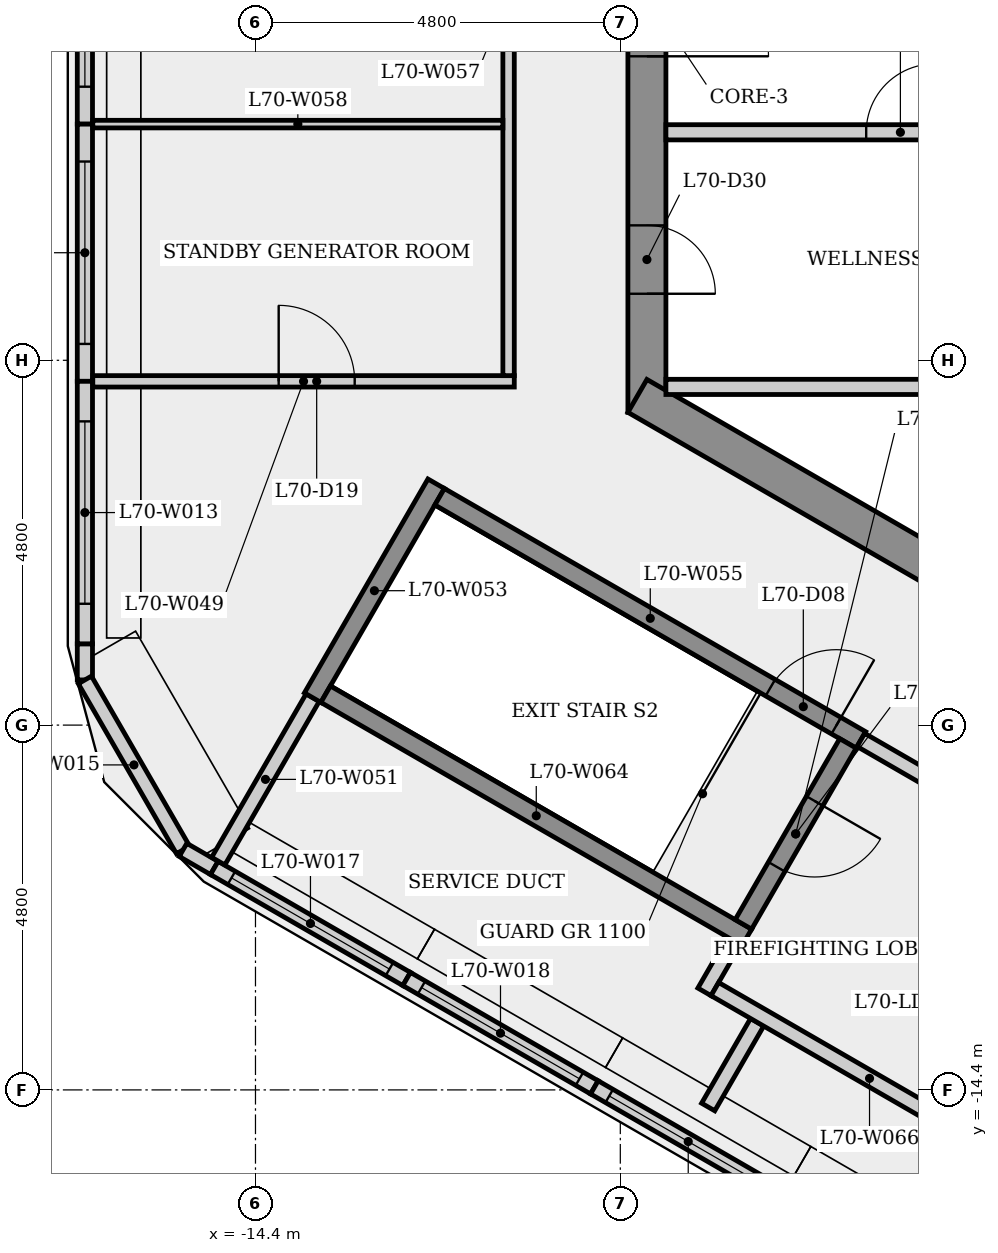
"""IFC4 building model, lengths in metres.
Left out: names, types, materials, properties, quantities, classifications, styles, units other than length and angle.
Written with IfcOpenShell. Run it as: python <this file> out.ifc"""

import sys

from ifc_helpers import new_model, si_unit, direction, frame, frame_2d, origin, place, context, subcontext, project, spatial, rectangle, extrude, element, fill, save


model = new_model("IFC4")
c1 = context("Model", 3, precision=1e-05, world=origin(), true_north=direction((0.0, 1.0)))
c2 = subcontext(c1, "Body", "Model", "MODEL_VIEW")
j1 = project(units=[si_unit("LENGTHUNIT", "METRE"), si_unit("PLANEANGLEUNIT", "RADIAN")], contexts=[c1])
p1 = place(None, origin())
s1 = spatial("IfcSite", under=j1, at=p1, CompositionType="ELEMENT")
p2 = place(p1, origin())
s2 = spatial("IfcBuilding", under=s1, at=p2, CompositionType="ELEMENT")
p3 = place(p2, frame((0.0, 0.0, 262.9)))
s3 = spatial("IfcBuildingStorey", under=s2, at=p3, CompositionType="ELEMENT", Elevation=262.9)
p4 = place(p3, frame((-9.25, 5.485, 0.0), z_axis=(0.0, 0.0, 1.0), x_axis=(0.0, -1.0, 0.0)))
e1 = element("IfcWall", 1, at=p4, inside=s3, PredefinedType="SHEAR", context=c2, shape_type="SweptSolid", body=[
    extrude(rectangle(XDim=10.97, YDim=0.5, at=frame_2d((5.485, 0.0))), origin(), (0.0, 0.0, 1.0), 4.8),
])
p5 = place(p4, frame((8.509, 0.0, 0.0)))
e2 = element("IfcOpeningElement", 2, at=p5, cuts=e1, PredefinedType="OPENING", context=c2, shape_type="SweptSolid", body=[
    extrude(rectangle(XDim=0.9, YDim=2.1, at=frame_2d((0.45, 1.05))), frame((0.0, 0.26, 0.0), z_axis=(0.0, -1.0, 0.0), x_axis=(1.0, 0.0, 0.0)), (0.0, 0.0, 1.0), 0.52),
])
p6 = place(p4, frame((4.685, 0.0, 0.0)))
e3 = element("IfcOpeningElement", 3, at=p6, cuts=e1, PredefinedType="OPENING", context=c2, shape_type="SweptSolid", body=[
    extrude(rectangle(XDim=1.6, YDim=2.1, at=frame_2d((0.8, 1.05))), frame((0.0, 0.26, 0.0), z_axis=(0.0, -1.0, 0.0), x_axis=(1.0, 0.0, 0.0)), (0.0, 0.0, 1.0), 0.52),
])
p7 = place(p3, frame((-9.375, -5.268, 0.0), z_axis=(0.0, 0.0, 1.0), x_axis=(0.866023993627, -0.500002442456, 0.0)))
e4 = element("IfcWall", 4, at=p7, inside=s3, PredefinedType="SHEAR", context=c2, shape_type="SweptSolid", body=[
    extrude(rectangle(XDim=10.97, YDim=0.5, at=frame_2d((5.485, 0.0))), origin(), (0.0, 0.0, 1.0), 4.8),
])
p8 = place(p7, frame((4.804, 0.0, 0.0)))
e5 = element("IfcOpeningElement", 5, at=p8, cuts=e4, PredefinedType="OPENING", context=c2, shape_type="SweptSolid", body=[
    extrude(rectangle(XDim=0.9, YDim=2.1, at=frame_2d((0.45, 1.05))), frame((0.0, 0.26, 0.0), z_axis=(0.0, -1.0, 0.0), x_axis=(1.0, 0.0, 0.0)), (0.0, 0.0, 1.0), 0.52),
])
p9 = place(p3, frame((-16.645, 1.692, 0.0), z_axis=(0.0, 0.0, 1.0), x_axis=(0.0, -1.0, 0.0)))
e6 = element("IfcWall", 6, at=p9, inside=s3, PredefinedType="SOLIDWALL", context=c2, shape_type="SweptSolid", body=[
    extrude(rectangle(XDim=3.385, YDim=0.2, at=frame_2d((1.692, 0.0))), origin(), (0.0, 0.0, 1.0), 4.8),
])
p10 = place(p9, frame((0.492, 0.0, 0.8)))
e7 = element("IfcOpeningElement", 7, at=p10, cuts=e6, PredefinedType="OPENING", context=c2, shape_type="SweptSolid", body=[
    extrude(rectangle(XDim=2.4, YDim=2.4, at=frame_2d((1.2, 1.2))), frame((0.0, 0.11, 0.0), z_axis=(0.0, -1.0, 0.0), x_axis=(1.0, 0.0, 0.0)), (0.0, 0.0, 1.0), 0.22),
])
p11 = place(p3, frame((-16.645, -1.693, 0.0), z_axis=(0.0, 0.0, 1.0), x_axis=(0.0, -1.0, 0.0)))
e8 = element("IfcWall", 8, at=p11, inside=s3, PredefinedType="SOLIDWALL", context=c2, shape_type="SweptSolid", body=[
    extrude(rectangle(XDim=3.384, YDim=0.2, at=frame_2d((1.692, 0.0))), origin(), (0.0, 0.0, 1.0), 4.8),
])
p12 = place(p11, frame((0.492, 0.0, 0.8)))
e9 = element("IfcOpeningElement", 9, at=p12, cuts=e8, PredefinedType="OPENING", context=c2, shape_type="SweptSolid", body=[
    extrude(rectangle(XDim=2.4, YDim=2.4, at=frame_2d((1.2, 1.2))), frame((0.0, 0.11, 0.0), z_axis=(0.0, -1.0, 0.0), x_axis=(1.0, 0.0, 0.0)), (0.0, 0.0, 1.0), 0.22),
])
p13 = place(p3, frame((-16.645, -5.076, 0.0), z_axis=(0.0, 0.0, 1.0), x_axis=(0.0, -1.0, 0.0)))
e10 = element("IfcWall", 10, at=p13, inside=s3, PredefinedType="SOLIDWALL", context=c2, shape_type="SweptSolid", body=[
    extrude(rectangle(XDim=3.454, YDim=0.2, at=frame_2d((1.727, 0.0))), origin(), (0.0, 0.0, 1.0), 4.8),
])
p14 = place(p13, frame((0.527, 0.0, 0.8)))
e11 = element("IfcOpeningElement", 11, at=p14, cuts=e10, PredefinedType="OPENING", context=c2, shape_type="SweptSolid", body=[
    extrude(rectangle(XDim=2.4, YDim=2.4, at=frame_2d((1.2, 1.2))), frame((0.0, 0.11, 0.0), z_axis=(0.0, -1.0, 0.0), x_axis=(1.0, 0.0, 0.0)), (0.0, 0.0, 1.0), 0.22),
])
p15 = place(p3, frame((-16.645, -8.531, 0.0), z_axis=(0.0, 0.0, 1.0), x_axis=(0.0, -1.0, 0.0)))
e12 = element("IfcWall", 12, at=p15, inside=s3, PredefinedType="SOLIDWALL", context=c2, shape_type="SweptSolid", body=[
    extrude(rectangle(XDim=0.475, YDim=0.2, at=frame_2d((0.237, 0.0))), origin(), (0.0, 0.0, 1.0), 4.8),
])
p16 = place(p3, frame((-16.645, -9.005, 0.0), z_axis=(0.0, 0.0, 1.0), x_axis=(0.499992497538, -0.86602973529, 0.0)))
e13 = element("IfcWall", 13, at=p16, inside=s3, PredefinedType="SOLIDWALL", context=c2, shape_type="SweptSolid", body=[
    extrude(rectangle(XDim=2.583, YDim=0.2, at=frame_2d((1.291, 0.0))), origin(), (0.0, 0.0, 1.0), 4.8),
])
p17 = place(p3, frame((-15.353, -11.242, 0.0), z_axis=(0.0, 0.0, 1.0), x_axis=(0.865988727248, -0.500063520245, 0.0)))
e14 = element("IfcWall", 14, at=p17, inside=s3, PredefinedType="SOLIDWALL", context=c2, shape_type="SweptSolid", body=[
    extrude(rectangle(XDim=0.475, YDim=0.2, at=frame_2d((0.238, 0.0))), origin(), (0.0, 0.0, 1.0), 4.8),
])
p18 = place(p3, frame((-14.942, -11.479, 0.0), z_axis=(0.0, 0.0, 1.0), x_axis=(0.866033925456, -0.499985239742, 0.0)))
e15 = element("IfcWall", 15, at=p18, inside=s3, PredefinedType="SOLIDWALL", context=c2, shape_type="SweptSolid", body=[
    extrude(rectangle(XDim=2.922, YDim=0.2, at=frame_2d((1.461, 0.0))), origin(), (0.0, 0.0, 1.0), 4.8),
])
p19 = place(p18, frame((0.261, 0.0, 0.8)))
e16 = element("IfcOpeningElement", 16, at=p19, cuts=e15, PredefinedType="OPENING", context=c2, shape_type="SweptSolid", body=[
    extrude(rectangle(XDim=2.4, YDim=2.4, at=frame_2d((1.2, 1.2))), frame((0.0, 0.11, 0.0), z_axis=(0.0, -1.0, 0.0), x_axis=(1.0, 0.0, 0.0)), (0.0, 0.0, 1.0), 0.22),
])
p20 = place(p3, frame((-12.411, -12.94, 0.0), z_axis=(0.0, 0.0, 1.0), x_axis=(0.866027356191, -0.499996618317, 0.0)))
e17 = element("IfcWall", 17, at=p20, inside=s3, PredefinedType="SOLIDWALL", context=c2, shape_type="SweptSolid", body=[
    extrude(rectangle(XDim=2.852, YDim=0.2, at=frame_2d((1.426, 0.0))), origin(), (0.0, 0.0, 1.0), 4.8),
])
p21 = place(p20, frame((0.226, 0.0, 0.8)))
e18 = element("IfcOpeningElement", 18, at=p21, cuts=e17, PredefinedType="OPENING", context=c2, shape_type="SweptSolid", body=[
    extrude(rectangle(XDim=2.4, YDim=2.4, at=frame_2d((1.2, 1.2))), frame((0.0, 0.11, 0.0), z_axis=(0.0, -1.0, 0.0), x_axis=(1.0, 0.0, 0.0)), (0.0, 0.0, 1.0), 0.22),
])
p22 = place(p3, frame((-9.941, -14.366, 0.0), z_axis=(0.0, 0.0, 1.0), x_axis=(0.866027356191, -0.499996618317, 0.0)))
e19 = element("IfcWall", 19, at=p22, inside=s3, PredefinedType="SOLIDWALL", context=c2, shape_type="SweptSolid", body=[
    extrude(rectangle(XDim=2.852, YDim=0.2, at=frame_2d((1.426, 0.0))), origin(), (0.0, 0.0, 1.0), 4.8),
])
p23 = place(p22, frame((0.226, 0.0, 0.8)))
e20 = element("IfcOpeningElement", 20, at=p23, cuts=e19, PredefinedType="OPENING", context=c2, shape_type="SweptSolid", body=[
    extrude(rectangle(XDim=2.4, YDim=2.4, at=frame_2d((1.2, 1.2))), frame((0.0, 0.11, 0.0), z_axis=(0.0, -1.0, 0.0), x_axis=(1.0, 0.0, 0.0)), (0.0, 0.0, 1.0), 0.22),
])
p24 = place(p3, frame((-16.541, -5.077, 0.0), z_axis=(0.0, 0.0, 1.0), x_axis=(1.0, 0.0, 0.0)))
e21 = element("IfcWall", 21, at=p24, inside=s3, PredefinedType="PARTITIONING", context=c2, shape_type="SweptSolid", body=[
    extrude(rectangle(XDim=5.545, YDim=0.15, at=frame_2d((2.773, 0.0))), origin(), (0.0, 0.0, 1.0), 4.5),
])
p25 = place(p24, frame((2.446, 0.0, 0.0)))
e22 = element("IfcOpeningElement", 22, at=p25, cuts=e21, PredefinedType="OPENING", context=c2, shape_type="SweptSolid", body=[
    extrude(rectangle(XDim=1.0, YDim=2.1, at=frame_2d((0.5, 1.05))), frame((0.0, 0.085, 0.0), z_axis=(0.0, -1.0, 0.0), x_axis=(1.0, 0.0, 0.0)), (0.0, 0.0, 1.0), 0.17),
])
p26 = place(p3, frame((-14.89, -11.39, 0.0), z_axis=(0.0, 0.0, 1.0), x_axis=(0.499966389646, 0.866044807862, 0.0)))
e23 = element("IfcWall", 23, at=p26, inside=s3, PredefinedType="PLUMBINGWALL", context=c2, shape_type="SweptSolid", body=[
    extrude(rectangle(XDim=2.484, YDim=0.2, at=frame_2d((1.242, 0.0))), origin(), (0.0, 0.0, 1.0), 4.5),
])
p27 = place(p3, frame((-13.648, -9.239, 0.0), z_axis=(0.0, 0.0, 1.0), x_axis=(0.500017246033, 0.866015446554, 0.0)))
e24 = element("IfcWall", 24, at=p27, inside=s3, PredefinedType="SHEAR", context=c2, shape_type="SweptSolid", body=[
    extrude(rectangle(XDim=3.25, YDim=0.25, at=frame_2d((1.625, 0.0))), origin(), (0.0, 0.0, 1.0), 4.5),
])
p28 = place(p3, frame((-11.977, -6.595, 0.0), z_axis=(0.0, 0.0, 1.0), x_axis=(0.866025499775, -0.499999833739, 0.0)))
e25 = element("IfcWall", 25, at=p28, inside=s3, PredefinedType="SHEAR", context=c2, shape_type="SweptSolid", body=[
    extrude(rectangle(XDim=6.4, YDim=0.25, at=frame_2d((3.2, 0.0))), origin(), (0.0, 0.0, 1.0), 4.5),
])
p29 = place(p28, frame((5.025, 0.0, 0.0)))
e26 = element("IfcOpeningElement", 26, at=p29, cuts=e25, PredefinedType="OPENING", context=c2, shape_type="SweptSolid", body=[
    extrude(rectangle(XDim=1.0, YDim=2.1, at=frame_2d((0.5, 1.05))), frame((0.0, 0.135, 0.0), z_axis=(0.0, -1.0, 0.0), x_axis=(1.0, 0.0, 0.0)), (0.0, 0.0, 1.0), 0.27),
])
p30 = place(p3, frame((-11.07, -5.002, 0.0), z_axis=(0.0, 0.0, 1.0), x_axis=(0.0, 1.0, 0.0)))
e27 = element("IfcWall", 27, at=p30, inside=s3, PredefinedType="PARTITIONING", context=c2, shape_type="SweptSolid", body=[
    extrude(rectangle(XDim=10.003, YDim=0.15, at=frame_2d((5.002, 0.0))), origin(), (0.0, 0.0, 1.0), 4.5),
])
p31 = place(p30, frame((6.172, 0.0, 0.0)))
e28 = element("IfcOpeningElement", 28, at=p31, cuts=e27, PredefinedType="OPENING", context=c2, shape_type="SweptSolid", body=[
    extrude(rectangle(XDim=1.0, YDim=2.1, at=frame_2d((0.5, 1.05))), frame((0.0, 0.085, 0.0), z_axis=(0.0, -1.0, 0.0), x_axis=(1.0, 0.0, 0.0)), (0.0, 0.0, 1.0), 0.17),
])
p32 = place(p3, frame((-11.145, -1.692, 0.0), z_axis=(0.0, 0.0, 1.0), x_axis=(-1.0, 0.0, 0.0)))
e29 = element("IfcWall", 29, at=p32, inside=s3, PredefinedType="PARTITIONING", context=c2, shape_type="SweptSolid", body=[
    extrude(rectangle(XDim=5.396, YDim=0.1, at=frame_2d((2.698, 0.0))), origin(), (0.0, 0.0, 1.0), 4.5),
])
p33 = place(p3, frame((-9.0, -5.15, 0.0), z_axis=(0.0, 0.0, 1.0), x_axis=(1.0, 0.0, 0.0)))
e30 = element("IfcWall", 30, at=p33, inside=s3, PredefinedType="PARTITIONING", context=c2, shape_type="SweptSolid", body=[
    extrude(rectangle(XDim=11.325, YDim=0.2, at=frame_2d((5.663, 0.0))), origin(), (0.0, 0.0, 1.0), 4.5),
])
p34 = place(p3, frame((-8.493, -13.11, 0.0), z_axis=(0.0, 0.0, 1.0), x_axis=(0.500067724834, 0.865986299303, 0.0)))
e31 = element("IfcWall", 31, at=p34, inside=s3, PredefinedType="PLUMBINGWALL", context=c2, shape_type="SweptSolid", body=[
    extrude(rectangle(XDim=0.775, YDim=0.2, at=frame_2d((0.388, 0.0))), origin(), (0.0, 0.0, 1.0), 4.5),
])
p35 = place(p3, frame((-7.935, -12.393, 0.0), z_axis=(0.0, 0.0, 1.0), x_axis=(-0.866025499775, 0.499999833739, 0.0)))
e32 = element("IfcWall", 32, at=p35, inside=s3, PredefinedType="SHEAR", context=c2, shape_type="SweptSolid", body=[
    extrude(rectangle(XDim=6.4, YDim=0.25, at=frame_2d((3.2, 0.0))), origin(), (0.0, 0.0, 1.0), 4.5),
])
p36 = place(p3, frame((-7.8, -13.51, 0.0), z_axis=(0.0, 0.0, 1.0), x_axis=(-0.499892088923, -0.86608769731, 0.0)))
e33 = element("IfcWall", 33, at=p36, inside=s3, PredefinedType="PLUMBINGWALL", context=c2, shape_type="SweptSolid", body=[
    extrude(rectangle(XDim=1.287, YDim=0.2, at=frame_2d((0.644, 0.0))), origin(), (0.0, 0.0, 1.0), 4.5),
])
p37 = place(p3, frame((-8.356, -13.073, 0.0), z_axis=(0.0, 0.0, 1.0), x_axis=(0.866038532462, -0.499977259774, 0.0)))
e34 = element("IfcWall", 34, at=p37, inside=s3, PredefinedType="PLUMBINGWALL", context=c2, shape_type="SweptSolid", body=[
    extrude(rectangle(XDim=4.7, YDim=0.2, at=frame_2d((2.35, 0.0))), origin(), (0.0, 0.0, 1.0), 4.5),
])
p38 = place(p3, frame((-6.605, -9.841, 0.0), z_axis=(0.0, 0.0, 1.0), x_axis=(-0.499996545922, -0.866027397988, 0.0)))
e35 = element("IfcWall", 35, at=p38, inside=s3, PredefinedType="SHEAR", context=c2, shape_type="SweptSolid", body=[
    extrude(rectangle(XDim=2.75, YDim=0.25, at=frame_2d((1.375, 0.0))), origin(), (0.0, 0.0, 1.0), 4.5),
])
p39 = place(p38, frame((0.875, 0.0, 0.0)))
e36 = element("IfcOpeningElement", 36, at=p39, cuts=e35, PredefinedType="OPENING", context=c2, shape_type="SweptSolid", body=[
    extrude(rectangle(XDim=1.0, YDim=2.1, at=frame_2d((0.5, 1.05))), frame((0.0, 0.135, 0.0), z_axis=(0.0, -1.0, 0.0), x_axis=(1.0, 0.0, 0.0)), (0.0, 0.0, 1.0), 0.27),
])
p40 = place(p3, frame((-6.435, -9.795, 0.0), z_axis=(0.0, 0.0, 1.0), x_axis=(0.866012907634, -0.500021643343, 0.0)))
e37 = element("IfcWall", 37, at=p40, inside=s3, PredefinedType="PARTITIONING", context=c2, shape_type="SweptSolid", body=[
    extrude(rectangle(XDim=4.45, YDim=0.2, at=frame_2d((2.225, 0.0))), origin(), (0.0, 0.0, 1.0), 4.5),
])
p41 = place(p40, frame((1.675, 0.0, 0.0)))
e38 = element("IfcOpeningElement", 38, at=p41, cuts=e37, PredefinedType="OPENING", context=c2, shape_type="SweptSolid", body=[
    extrude(rectangle(XDim=1.1, YDim=2.1, at=frame_2d((0.55, 1.05))), frame((0.0, 0.11, 0.0), z_axis=(0.0, -1.0, 0.0), x_axis=(1.0, 0.0, 0.0)), (0.0, 0.0, 1.0), 0.22),
])
p42 = place(p3, frame((-9.0, -1.8, 0.0), z_axis=(0.0, 0.0, 1.0), x_axis=(1.0, 0.0, 0.0)))
e39 = element("IfcWall", 39, at=p42, inside=s3, PredefinedType="PARTITIONING", context=c2, shape_type="SweptSolid", body=[
    extrude(rectangle(XDim=11.325, YDim=0.2, at=frame_2d((5.663, 0.0))), origin(), (0.0, 0.0, 1.0), 4.5),
])
p43 = place(p42, frame((2.635, 0.0, 0.0)))
e40 = element("IfcOpeningElement", 40, at=p43, cuts=e39, PredefinedType="OPENING", context=c2, shape_type="SweptSolid", body=[
    extrude(rectangle(XDim=0.9, YDim=2.1, at=frame_2d((0.45, 1.05))), frame((0.0, 0.11, 0.0), z_axis=(0.0, -1.0, 0.0), x_axis=(1.0, 0.0, 0.0)), (0.0, 0.0, 1.0), 0.22),
])
p44 = place(p42, frame((7.165, 0.0, 0.0)))
e41 = element("IfcOpeningElement", 41, at=p44, cuts=e39, PredefinedType="OPENING", context=c2, shape_type="SweptSolid", body=[
    extrude(rectangle(XDim=0.9, YDim=2.1, at=frame_2d((0.45, 1.05))), frame((0.0, 0.11, 0.0), z_axis=(0.0, -1.0, 0.0), x_axis=(1.0, 0.0, 0.0)), (0.0, 0.0, 1.0), 0.22),
])
p45 = place(p10, origin())
e42 = element("IfcWindow", 42, at=p45, inside=s3, PartitioningType="SINGLE_PANEL", PredefinedType="WINDOW", context=c2, shape_type="SweptSolid", body=[
    extrude(rectangle(XDim=2.4, YDim=2.4, at=frame_2d((1.2, 1.2))), frame((0.0, 0.03, 0.0), z_axis=(0.0, -1.0, 0.0), x_axis=(1.0, 0.0, 0.0)), (0.0, 0.0, 1.0), 0.06),
])
fill(e7, e42)
p46 = place(p12, origin())
e43 = element("IfcWindow", 43, at=p46, inside=s3, PartitioningType="SINGLE_PANEL", PredefinedType="WINDOW", context=c2, shape_type="SweptSolid", body=[
    extrude(rectangle(XDim=2.4, YDim=2.4, at=frame_2d((1.2, 1.2))), frame((0.0, 0.03, 0.0), z_axis=(0.0, -1.0, 0.0), x_axis=(1.0, 0.0, 0.0)), (0.0, 0.0, 1.0), 0.06),
])
fill(e9, e43)
p47 = place(p14, origin())
e44 = element("IfcWindow", 44, at=p47, inside=s3, PartitioningType="SINGLE_PANEL", PredefinedType="WINDOW", context=c2, shape_type="SweptSolid", body=[
    extrude(rectangle(XDim=2.4, YDim=2.4, at=frame_2d((1.2, 1.2))), frame((0.0, 0.03, 0.0), z_axis=(0.0, -1.0, 0.0), x_axis=(1.0, 0.0, 0.0)), (0.0, 0.0, 1.0), 0.06),
])
fill(e11, e44)
p48 = place(p19, origin())
e45 = element("IfcWindow", 45, at=p48, inside=s3, PartitioningType="SINGLE_PANEL", PredefinedType="WINDOW", context=c2, shape_type="SweptSolid", body=[
    extrude(rectangle(XDim=2.4, YDim=2.4, at=frame_2d((1.2, 1.2))), frame((0.0, 0.03, 0.0), z_axis=(0.0, -1.0, 0.0), x_axis=(1.0, 0.0, 0.0)), (0.0, 0.0, 1.0), 0.06),
])
fill(e16, e45)
p49 = place(p21, origin())
e46 = element("IfcWindow", 46, at=p49, inside=s3, PartitioningType="SINGLE_PANEL", PredefinedType="WINDOW", context=c2, shape_type="SweptSolid", body=[
    extrude(rectangle(XDim=2.4, YDim=2.4, at=frame_2d((1.2, 1.2))), frame((0.0, 0.03, 0.0), z_axis=(0.0, -1.0, 0.0), x_axis=(1.0, 0.0, 0.0)), (0.0, 0.0, 1.0), 0.06),
])
fill(e18, e46)
p50 = place(p23, origin())
e47 = element("IfcWindow", 47, at=p50, inside=s3, PartitioningType="SINGLE_PANEL", PredefinedType="WINDOW", context=c2, shape_type="SweptSolid", body=[
    extrude(rectangle(XDim=2.4, YDim=2.4, at=frame_2d((1.2, 1.2))), frame((0.0, 0.03, 0.0), z_axis=(0.0, -1.0, 0.0), x_axis=(1.0, 0.0, 0.0)), (0.0, 0.0, 1.0), 0.06),
])
fill(e20, e47)
p51 = place(p43, origin())
e48 = element("IfcDoor", 48, at=p51, inside=s3, OperationType="SINGLE_SWING_RIGHT", PredefinedType="DOOR", context=c2, shape_type="SweptSolid", body=[
    extrude(rectangle(XDim=0.9, YDim=2.1, at=frame_2d((0.45, 1.05))), frame((0.0, 0.025, 0.0), z_axis=(0.0, -1.0, 0.0), x_axis=(1.0, 0.0, 0.0)), (0.0, 0.0, 1.0), 0.05),
])
fill(e40, e48)
p52 = place(p29, origin())
e49 = element("IfcDoor", 49, at=p52, inside=s3, OperationType="SINGLE_SWING_RIGHT", PredefinedType="DOOR", context=c2, shape_type="SweptSolid", body=[
    extrude(rectangle(XDim=1.0, YDim=2.1, at=frame_2d((0.5, 1.05))), frame((0.0, 0.025, 0.0), z_axis=(0.0, -1.0, 0.0), x_axis=(1.0, 0.0, 0.0)), (0.0, 0.0, 1.0), 0.05),
])
fill(e26, e49)
p53 = place(p39, origin())
e50 = element("IfcDoor", 50, at=p53, inside=s3, OperationType="SINGLE_SWING_LEFT", PredefinedType="DOOR", context=c2, shape_type="SweptSolid", body=[
    extrude(rectangle(XDim=1.0, YDim=2.1, at=frame_2d((0.5, 1.05))), frame((0.0, 0.025, 0.0), z_axis=(0.0, -1.0, 0.0), x_axis=(1.0, 0.0, 0.0)), (0.0, 0.0, 1.0), 0.05),
])
fill(e36, e50)
p54 = place(p25, origin())
e51 = element("IfcDoor", 51, at=p54, inside=s3, OperationType="SINGLE_SWING_LEFT", PredefinedType="DOOR", context=c2, shape_type="SweptSolid", body=[
    extrude(rectangle(XDim=1.0, YDim=2.1, at=frame_2d((0.5, 1.05))), frame((0.0, 0.025, 0.0), z_axis=(0.0, -1.0, 0.0), x_axis=(1.0, 0.0, 0.0)), (0.0, 0.0, 1.0), 0.05),
])
fill(e22, e51)
p55 = place(p5, origin())
e52 = element("IfcDoor", 52, at=p55, inside=s3, OperationType="SINGLE_SWING_RIGHT", PredefinedType="DOOR", context=c2, shape_type="SweptSolid", body=[
    extrude(rectangle(XDim=0.9, YDim=2.1, at=frame_2d((0.45, 1.05))), frame((0.0, 0.025, 0.0), z_axis=(0.0, -1.0, 0.0), x_axis=(1.0, 0.0, 0.0)), (0.0, 0.0, 1.0), 0.05),
])
fill(e2, e52)
p56 = place(p6, origin())
e53 = element("IfcDoor", 53, at=p56, inside=s3, OperationType="SINGLE_SWING_RIGHT", PredefinedType="DOOR", context=c2, shape_type="SweptSolid", body=[
    extrude(rectangle(XDim=1.6, YDim=2.1, at=frame_2d((0.8, 1.05))), frame((0.0, 0.025, 0.0), z_axis=(0.0, -1.0, 0.0), x_axis=(1.0, 0.0, 0.0)), (0.0, 0.0, 1.0), 0.05),
])
fill(e3, e53)
save(model, sys.argv[1])
